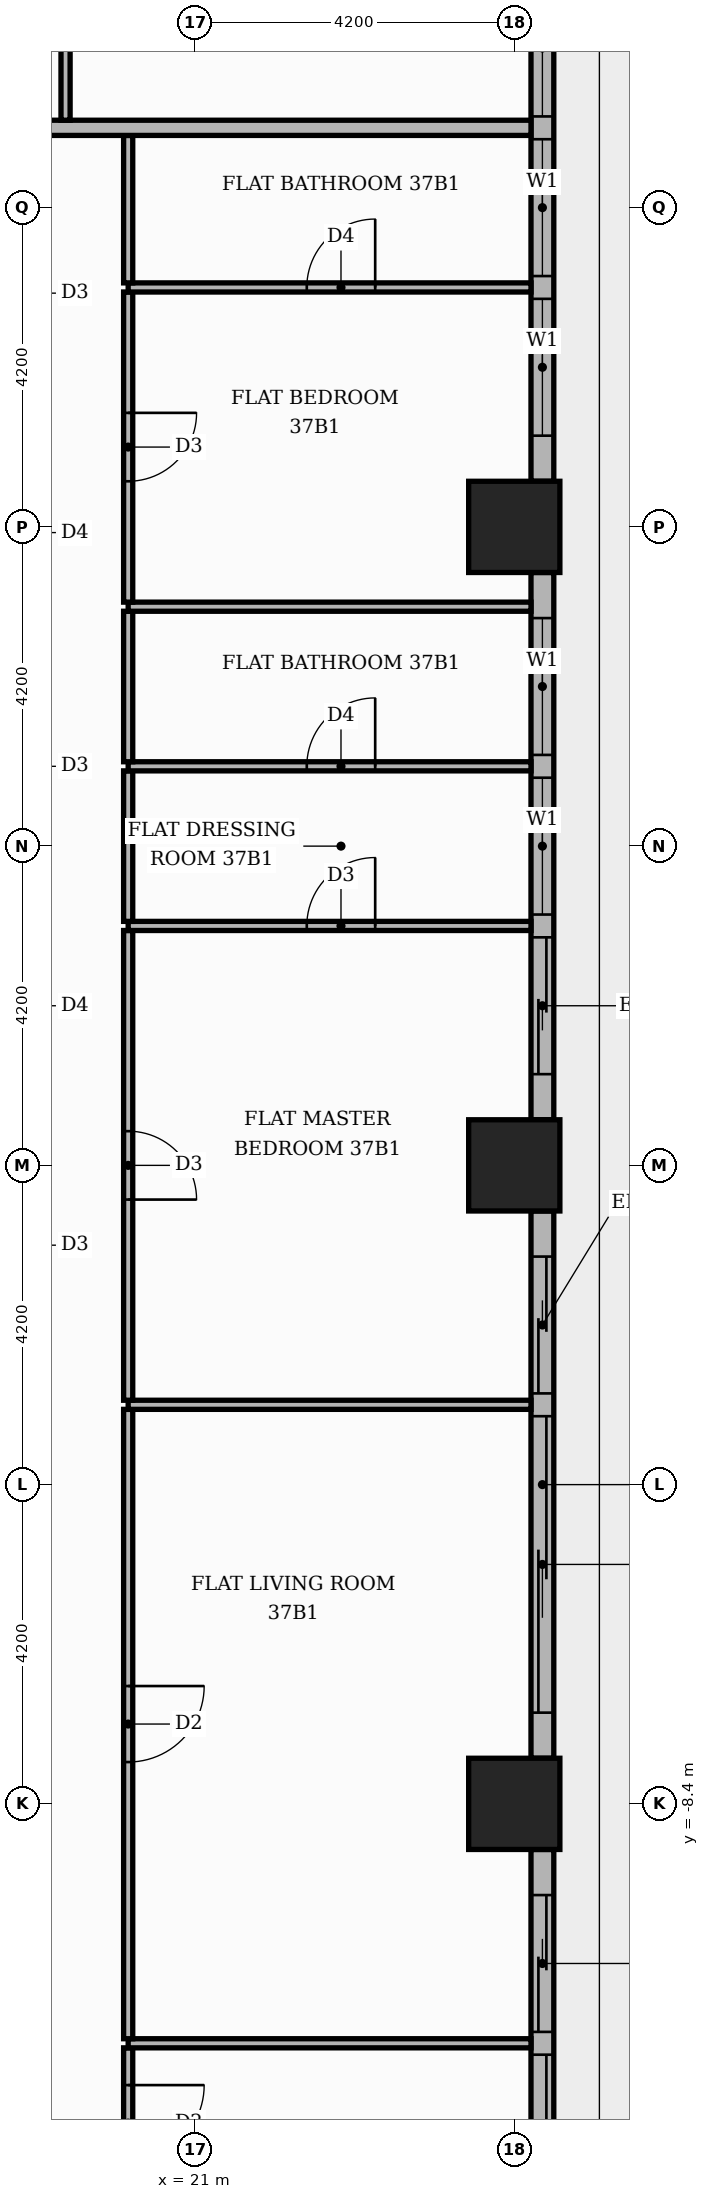
"""IFC4 building model, lengths in metres.
Left out: names, types, materials, properties, quantities, classifications, styles, units other than length and angle.
Written with IfcOpenShell. Run it as: python <this file> out.ifc"""

import sys

from ifc_helpers import new_model, si_unit, direction, frame, frame_2d, origin, origin_2d, place, context, subcontext, project, spatial, rectangle, extrude, element, fill, save


model = new_model("IFC4")
c1 = context("Model", 3, precision=1e-05, world=origin(), true_north=direction((0.0, 1.0)))
c2 = subcontext(c1, "Body", "Model", "MODEL_VIEW")
j1 = project(units=[si_unit("LENGTHUNIT", "METRE"), si_unit("PLANEANGLEUNIT", "RADIAN")], contexts=[c1])
p1 = place(None, origin())
s1 = spatial("IfcSite", under=j1, at=p1, CompositionType="ELEMENT")
p2 = place(p1, origin())
s2 = spatial("IfcBuilding", under=s1, at=p2, CompositionType="ELEMENT")
p3 = place(p2, frame((0.0, 0.0, 157.2)))
s3 = spatial("IfcBuildingStorey", under=s2, at=p3, CompositionType="ELEMENT", Elevation=157.2)
for number, where, z_axis, x_axis in (
    (1, (25.2, 0.0, 0.0), (0.0, 0.0, 1.0), (1.0, 0.0, 0.0)),
    (2, (25.2, 8.4, 0.0), (0.0, 0.0, 1.0), (1.0, 0.0, 0.0)),
    (3, (25.2, -8.4, 0.0), (0.0, 0.0, 1.0), (1.0, 0.0, 0.0)),
):
    element("IfcColumn", number, at=place(p3, frame(where, z_axis=z_axis, x_axis=x_axis)), inside=s3, PredefinedType="COLUMN", context=c2, shape_type="SweptSolid", body=[
        extrude(rectangle(XDim=1.2, YDim=1.2, at=origin_2d()), origin(), (0.0, 0.0, 1.0), 3.9),
    ])
p4 = place(p3, frame((25.57, -16.2, 0.0), z_axis=(0.0, 0.0, 1.0), x_axis=(0.0, 1.0, 0.0)))
e4 = element("IfcWall", 4, at=p4, inside=s3, PredefinedType="STANDARD", context=c2, shape_type="SweptSolid", body=[
    extrude(rectangle(XDim=7.2, YDim=0.3, at=frame_2d((3.6, 0.0))), origin(), (0.0, 0.0, 1.0), 3.48),
])
p5 = place(p4, frame((0.6, 0.0, 0.0)))
e5 = element("IfcOpeningElement", 5, at=p5, cuts=e4, PredefinedType="OPENING", context=c2, shape_type="SweptSolid", body=[
    extrude(rectangle(XDim=3.9, YDim=2.4, at=frame_2d((1.95, 1.2))), frame((0.0, 0.16, 0.0), z_axis=(0.0, -1.0, 0.0), x_axis=(1.0, 0.0, 0.0)), (0.0, 0.0, 1.0), 0.32),
])
p6 = place(p4, frame((4.8, 0.0, 0.0)))
e6 = element("IfcOpeningElement", 6, at=p6, cuts=e4, PredefinedType="OPENING", context=c2, shape_type="SweptSolid", body=[
    extrude(rectangle(XDim=1.8, YDim=2.4, at=frame_2d((0.9, 1.2))), frame((0.0, 0.16, 0.0), z_axis=(0.0, -1.0, 0.0), x_axis=(1.0, 0.0, 0.0)), (0.0, 0.0, 1.0), 0.32),
])
p7 = place(p3, frame((25.57, -7.8, 0.0), z_axis=(0.0, 0.0, 1.0), x_axis=(0.0, 1.0, 0.0)))
e7 = element("IfcWall", 7, at=p7, inside=s3, PredefinedType="STANDARD", context=c2, shape_type="SweptSolid", body=[
    extrude(rectangle(XDim=7.2, YDim=0.3, at=frame_2d((3.6, 0.0))), origin(), (0.0, 0.0, 1.0), 3.48),
])
p8 = place(p7, frame((0.6, 0.0, 0.0)))
e8 = element("IfcOpeningElement", 8, at=p8, cuts=e7, PredefinedType="OPENING", context=c2, shape_type="SweptSolid", body=[
    extrude(rectangle(XDim=3.9, YDim=2.4, at=frame_2d((1.95, 1.2))), frame((0.0, 0.16, 0.0), z_axis=(0.0, -1.0, 0.0), x_axis=(1.0, 0.0, 0.0)), (0.0, 0.0, 1.0), 0.32),
])
p9 = place(p7, frame((4.8, 0.0, 0.0)))
e9 = element("IfcOpeningElement", 9, at=p9, cuts=e7, PredefinedType="OPENING", context=c2, shape_type="SweptSolid", body=[
    extrude(rectangle(XDim=1.8, YDim=2.4, at=frame_2d((0.9, 1.2))), frame((0.0, 0.16, 0.0), z_axis=(0.0, -1.0, 0.0), x_axis=(1.0, 0.0, 0.0)), (0.0, 0.0, 1.0), 0.32),
])
p10 = place(p3, frame((25.57, 0.6, 0.0), z_axis=(0.0, 0.0, 1.0), x_axis=(0.0, 1.0, 0.0)))
e10 = element("IfcWall", 10, at=p10, inside=s3, PredefinedType="STANDARD", context=c2, shape_type="SweptSolid", body=[
    extrude(rectangle(XDim=7.2, YDim=0.3, at=frame_2d((3.6, 0.0))), origin(), (0.0, 0.0, 1.0), 3.48),
])
p11 = place(p10, frame((0.6, 0.0, 0.0)))
e11 = element("IfcOpeningElement", 11, at=p11, cuts=e10, PredefinedType="OPENING", context=c2, shape_type="SweptSolid", body=[
    extrude(rectangle(XDim=1.8, YDim=2.4, at=frame_2d((0.9, 1.2))), frame((0.0, 0.16, 0.0), z_axis=(0.0, -1.0, 0.0), x_axis=(1.0, 0.0, 0.0)), (0.0, 0.0, 1.0), 0.32),
])
p12 = place(p10, frame((2.7, 0.0, 0.9)))
e12 = element("IfcOpeningElement", 12, at=p12, cuts=e10, PredefinedType="OPENING", context=c2, shape_type="SweptSolid", body=[
    extrude(rectangle(XDim=1.8, YDim=2.1, at=frame_2d((0.9, 1.05))), frame((0.0, 0.16, 0.0), z_axis=(0.0, -1.0, 0.0), x_axis=(1.0, 0.0, 0.0)), (0.0, 0.0, 1.0), 0.32),
])
p13 = place(p10, frame((4.8, 0.0, 0.9)))
e13 = element("IfcOpeningElement", 13, at=p13, cuts=e10, PredefinedType="OPENING", context=c2, shape_type="SweptSolid", body=[
    extrude(rectangle(XDim=1.8, YDim=2.1, at=frame_2d((0.9, 1.05))), frame((0.0, 0.16, 0.0), z_axis=(0.0, -1.0, 0.0), x_axis=(1.0, 0.0, 0.0)), (0.0, 0.0, 1.0), 0.32),
])
p14 = place(p3, frame((25.57, 9.0, 0.0), z_axis=(0.0, 0.0, 1.0), x_axis=(0.0, 1.0, 0.0)))
e14 = element("IfcWall", 14, at=p14, inside=s3, PredefinedType="STANDARD", context=c2, shape_type="SweptSolid", body=[
    extrude(rectangle(XDim=7.2, YDim=0.3, at=frame_2d((3.6, 0.0))), origin(), (0.0, 0.0, 1.0), 3.48),
])
p15 = place(p14, frame((0.6, 0.0, 0.9)))
e15 = element("IfcOpeningElement", 15, at=p15, cuts=e14, PredefinedType="OPENING", context=c2, shape_type="SweptSolid", body=[
    extrude(rectangle(XDim=1.8, YDim=2.1, at=frame_2d((0.9, 1.05))), frame((0.0, 0.16, 0.0), z_axis=(0.0, -1.0, 0.0), x_axis=(1.0, 0.0, 0.0)), (0.0, 0.0, 1.0), 0.32),
])
p16 = place(p14, frame((2.7, 0.0, 0.9)))
e16 = element("IfcOpeningElement", 16, at=p16, cuts=e14, PredefinedType="OPENING", context=c2, shape_type="SweptSolid", body=[
    extrude(rectangle(XDim=1.8, YDim=2.1, at=frame_2d((0.9, 1.05))), frame((0.0, 0.16, 0.0), z_axis=(0.0, -1.0, 0.0), x_axis=(1.0, 0.0, 0.0)), (0.0, 0.0, 1.0), 0.32),
])
p17 = place(p14, frame((4.8, 0.0, 0.9)))
e17 = element("IfcOpeningElement", 17, at=p17, cuts=e14, PredefinedType="OPENING", context=c2, shape_type="SweptSolid", body=[
    extrude(rectangle(XDim=1.8, YDim=2.1, at=frame_2d((0.9, 1.05))), frame((0.0, 0.16, 0.0), z_axis=(0.0, -1.0, 0.0), x_axis=(1.0, 0.0, 0.0)), (0.0, 0.0, 1.0), 0.32),
])
p18 = place(p3, frame((20.12, -13.59, 0.0), z_axis=(0.0, 0.0, 1.0), x_axis=(0.0, 1.0, 0.0)))
e18 = element("IfcWall", 18, at=p18, inside=s3, PredefinedType="PARTITIONING", context=c2, shape_type="SweptSolid", body=[
    extrude(rectangle(XDim=1.98, YDim=0.12, at=frame_2d((0.99, 0.0))), origin(), (0.0, 0.0, 1.0), 3.48),
])
p19 = place(p18, frame((0.49, 0.0, 0.0)))
e19 = element("IfcOpeningElement", 19, at=p19, cuts=e18, PredefinedType="OPENING", context=c2, shape_type="SweptSolid", body=[
    extrude(rectangle(XDim=1.0, YDim=2.1, at=frame_2d((0.5, 1.05))), frame((0.0, 0.07, 0.0), z_axis=(0.0, -1.0, 0.0), x_axis=(1.0, 0.0, 0.0)), (0.0, 0.0, 1.0), 0.14),
])
p20 = place(p3, frame((20.12, -11.55, 0.0), z_axis=(0.0, 0.0, 1.0), x_axis=(1.0, 0.0, 0.0)))
e20 = element("IfcWall", 20, at=p20, inside=s3, PredefinedType="PARTITIONING", context=c2, shape_type="SweptSolid", body=[
    extrude(rectangle(XDim=5.3, YDim=0.12, at=frame_2d((2.65, 0.0))), origin(), (0.0, 0.0, 1.0), 3.48),
])
p21 = place(p3, frame((20.12, -11.49, 0.0), z_axis=(0.0, 0.0, 1.0), x_axis=(0.0, 1.0, 0.0)))
e21 = element("IfcWall", 21, at=p21, inside=s3, PredefinedType="PARTITIONING", context=c2, shape_type="SweptSolid", body=[
    extrude(rectangle(XDim=8.28, YDim=0.12, at=frame_2d((4.14, 0.0))), origin(), (0.0, 0.0, 1.0), 3.48),
])
p22 = place(p21, frame((3.64, 0.0, 0.0)))
e22 = element("IfcOpeningElement", 22, at=p22, cuts=e21, PredefinedType="OPENING", context=c2, shape_type="SweptSolid", body=[
    extrude(rectangle(XDim=1.0, YDim=2.1, at=frame_2d((0.5, 1.05))), frame((0.0, 0.07, 0.0), z_axis=(0.0, -1.0, 0.0), x_axis=(1.0, 0.0, 0.0)), (0.0, 0.0, 1.0), 0.14),
])
p23 = place(p3, frame((20.12, -3.15, 0.0), z_axis=(0.0, 0.0, 1.0), x_axis=(1.0, 0.0, 0.0)))
e23 = element("IfcWall", 23, at=p23, inside=s3, PredefinedType="PARTITIONING", context=c2, shape_type="SweptSolid", body=[
    extrude(rectangle(XDim=5.3, YDim=0.12, at=frame_2d((2.65, 0.0))), origin(), (0.0, 0.0, 1.0), 3.48),
])
p24 = place(p3, frame((20.12, -3.09, 0.0), z_axis=(0.0, 0.0, 1.0), x_axis=(0.0, 1.0, 0.0)))
e24 = element("IfcWall", 24, at=p24, inside=s3, PredefinedType="PARTITIONING", context=c2, shape_type="SweptSolid", body=[
    extrude(rectangle(XDim=6.18, YDim=0.12, at=frame_2d((3.09, 0.0))), origin(), (0.0, 0.0, 1.0), 3.48),
])
p25 = place(p24, frame((2.64, 0.0, 0.0)))
e25 = element("IfcOpeningElement", 25, at=p25, cuts=e24, PredefinedType="OPENING", context=c2, shape_type="SweptSolid", body=[
    extrude(rectangle(XDim=0.9, YDim=2.1, at=frame_2d((0.45, 1.05))), frame((0.0, 0.07, 0.0), z_axis=(0.0, -1.0, 0.0), x_axis=(1.0, 0.0, 0.0)), (0.0, 0.0, 1.0), 0.14),
])
p26 = place(p3, frame((20.12, 3.15, 0.0), z_axis=(0.0, 0.0, 1.0), x_axis=(1.0, 0.0, 0.0)))
e26 = element("IfcWall", 26, at=p26, inside=s3, PredefinedType="PARTITIONING", context=c2, shape_type="SweptSolid", body=[
    extrude(rectangle(XDim=5.3, YDim=0.12, at=frame_2d((2.65, 0.0))), origin(), (0.0, 0.0, 1.0), 3.48),
])
p27 = place(p26, frame((2.35, 0.0, 0.0)))
e27 = element("IfcOpeningElement", 27, at=p27, cuts=e26, PredefinedType="OPENING", context=c2, shape_type="SweptSolid", body=[
    extrude(rectangle(XDim=0.9, YDim=2.1, at=frame_2d((0.45, 1.05))), frame((0.0, 0.07, 0.0), z_axis=(0.0, -1.0, 0.0), x_axis=(1.0, 0.0, 0.0)), (0.0, 0.0, 1.0), 0.14),
])
p28 = place(p3, frame((20.12, 3.21, 0.0), z_axis=(0.0, 0.0, 1.0), x_axis=(0.0, 1.0, 0.0)))
e28 = element("IfcWall", 28, at=p28, inside=s3, PredefinedType="PARTITIONING", context=c2, shape_type="SweptSolid", body=[
    extrude(rectangle(XDim=1.98, YDim=0.12, at=frame_2d((0.99, 0.0))), origin(), (0.0, 0.0, 1.0), 3.48),
])
p29 = place(p3, frame((20.12, 5.25, 0.0), z_axis=(0.0, 0.0, 1.0), x_axis=(1.0, 0.0, 0.0)))
e29 = element("IfcWall", 29, at=p29, inside=s3, PredefinedType="PARTITIONING", context=c2, shape_type="SweptSolid", body=[
    extrude(rectangle(XDim=5.3, YDim=0.12, at=frame_2d((2.65, 0.0))), origin(), (0.0, 0.0, 1.0), 3.48),
])
p30 = place(p29, frame((2.35, 0.0, 0.0)))
e30 = element("IfcOpeningElement", 30, at=p30, cuts=e29, PredefinedType="OPENING", context=c2, shape_type="SweptSolid", body=[
    extrude(rectangle(XDim=0.9, YDim=2.1, at=frame_2d((0.45, 1.05))), frame((0.0, 0.07, 0.0), z_axis=(0.0, -1.0, 0.0), x_axis=(1.0, 0.0, 0.0)), (0.0, 0.0, 1.0), 0.14),
])
p31 = place(p3, frame((20.12, 5.31, 0.0), z_axis=(0.0, 0.0, 1.0), x_axis=(0.0, 1.0, 0.0)))
e31 = element("IfcWall", 31, at=p31, inside=s3, PredefinedType="PARTITIONING", context=c2, shape_type="SweptSolid", body=[
    extrude(rectangle(XDim=1.98, YDim=0.12, at=frame_2d((0.99, 0.0))), origin(), (0.0, 0.0, 1.0), 3.48),
])
p32 = place(p3, frame((20.12, 7.35, 0.0), z_axis=(0.0, 0.0, 1.0), x_axis=(1.0, 0.0, 0.0)))
e32 = element("IfcWall", 32, at=p32, inside=s3, PredefinedType="PARTITIONING", context=c2, shape_type="SweptSolid", body=[
    extrude(rectangle(XDim=5.3, YDim=0.12, at=frame_2d((2.65, 0.0))), origin(), (0.0, 0.0, 1.0), 3.48),
])
p33 = place(p3, frame((20.12, 7.41, 0.0), z_axis=(0.0, 0.0, 1.0), x_axis=(0.0, 1.0, 0.0)))
e33 = element("IfcWall", 33, at=p33, inside=s3, PredefinedType="PARTITIONING", context=c2, shape_type="SweptSolid", body=[
    extrude(rectangle(XDim=4.08, YDim=0.12, at=frame_2d((2.04, 0.0))), origin(), (0.0, 0.0, 1.0), 3.48),
])
p34 = place(p33, frame((1.59, 0.0, 0.0)))
e34 = element("IfcOpeningElement", 34, at=p34, cuts=e33, PredefinedType="OPENING", context=c2, shape_type="SweptSolid", body=[
    extrude(rectangle(XDim=0.9, YDim=2.1, at=frame_2d((0.45, 1.05))), frame((0.0, 0.07, 0.0), z_axis=(0.0, -1.0, 0.0), x_axis=(1.0, 0.0, 0.0)), (0.0, 0.0, 1.0), 0.14),
])
p35 = place(p3, frame((20.12, 11.55, 0.0), z_axis=(0.0, 0.0, 1.0), x_axis=(1.0, 0.0, 0.0)))
e35 = element("IfcWall", 35, at=p35, inside=s3, PredefinedType="PARTITIONING", context=c2, shape_type="SweptSolid", body=[
    extrude(rectangle(XDim=5.3, YDim=0.12, at=frame_2d((2.65, 0.0))), origin(), (0.0, 0.0, 1.0), 3.48),
])
p36 = place(p35, frame((2.35, 0.0, 0.0)))
e36 = element("IfcOpeningElement", 36, at=p36, cuts=e35, PredefinedType="OPENING", context=c2, shape_type="SweptSolid", body=[
    extrude(rectangle(XDim=0.9, YDim=2.1, at=frame_2d((0.45, 1.05))), frame((0.0, 0.07, 0.0), z_axis=(0.0, -1.0, 0.0), x_axis=(1.0, 0.0, 0.0)), (0.0, 0.0, 1.0), 0.14),
])
p37 = place(p3, frame((20.12, 11.61, 0.0), z_axis=(0.0, 0.0, 1.0), x_axis=(0.0, 1.0, 0.0)))
e37 = element("IfcWall", 37, at=p37, inside=s3, PredefinedType="PARTITIONING", context=c2, shape_type="SweptSolid", body=[
    extrude(rectangle(XDim=1.94, YDim=0.12, at=frame_2d((0.97, 0.0))), origin(), (0.0, 0.0, 1.0), 3.48),
])
p38 = place(p3, frame((-13.65, 13.65, 0.0), z_axis=(0.0, 0.0, 1.0), x_axis=(1.0, 0.0, 0.0)))
e38 = element("IfcWall", 38, at=p38, inside=s3, PredefinedType="PARTITIONING", context=c2, shape_type="SweptSolid", body=[
    extrude(rectangle(XDim=39.07, YDim=0.2, at=frame_2d((19.535, 0.0))), origin(), (0.0, 0.0, 1.0), 3.48),
])
p39 = place(p38, frame((24.65, 0.0, 0.0)))
e39 = element("IfcOpeningElement", 39, at=p39, cuts=e38, PredefinedType="OPENING", context=c2, shape_type="SweptSolid", body=[
    extrude(rectangle(XDim=1.1, YDim=2.4, at=frame_2d((0.55, 1.2))), frame((0.0, 0.11, 0.0), z_axis=(0.0, -1.0, 0.0), x_axis=(1.0, 0.0, 0.0)), (0.0, 0.0, 1.0), 0.22),
])
p40 = place(p38, frame((12.05, 0.0, 0.0)))
e40 = element("IfcOpeningElement", 40, at=p40, cuts=e38, PredefinedType="OPENING", context=c2, shape_type="SweptSolid", body=[
    extrude(rectangle(XDim=1.1, YDim=2.4, at=frame_2d((0.55, 1.2))), frame((0.0, 0.11, 0.0), z_axis=(0.0, -1.0, 0.0), x_axis=(1.0, 0.0, 0.0)), (0.0, 0.0, 1.0), 0.22),
])
p41 = place(p3, frame((19.296, 13.75, 0.0), z_axis=(0.0, 0.0, 1.0), x_axis=(0.0, 1.0, 0.0)))
e41 = element("IfcWall", 41, at=p41, inside=s3, PredefinedType="PARTITIONING", context=c2, shape_type="SweptSolid", body=[
    extrude(rectangle(XDim=3.75, YDim=0.12, at=frame_2d((1.875, 0.0))), origin(), (0.0, 0.0, 1.0), 3.48),
])
p42 = place(p5, origin())
e42 = element("IfcDoor", 42, at=p42, inside=s3, OperationType="SLIDING_TO_LEFT", PredefinedType="DOOR", context=c2, shape_type="SweptSolid", body=[
    extrude(rectangle(XDim=3.9, YDim=2.4, at=frame_2d((1.95, 1.2))), frame((0.0, 0.025, 0.0), z_axis=(0.0, -1.0, 0.0), x_axis=(1.0, 0.0, 0.0)), (0.0, 0.0, 1.0), 0.05),
])
fill(e5, e42)
p43 = place(p6, origin())
e43 = element("IfcDoor", 43, at=p43, inside=s3, OperationType="SLIDING_TO_RIGHT", PredefinedType="DOOR", context=c2, shape_type="SweptSolid", body=[
    extrude(rectangle(XDim=1.8, YDim=2.4, at=frame_2d((0.9, 1.2))), frame((0.0, 0.025, 0.0), z_axis=(0.0, -1.0, 0.0), x_axis=(1.0, 0.0, 0.0)), (0.0, 0.0, 1.0), 0.05),
])
fill(e6, e43)
p44 = place(p8, origin())
e44 = element("IfcDoor", 44, at=p44, inside=s3, OperationType="SLIDING_TO_LEFT", PredefinedType="DOOR", context=c2, shape_type="SweptSolid", body=[
    extrude(rectangle(XDim=3.9, YDim=2.4, at=frame_2d((1.95, 1.2))), frame((0.0, 0.025, 0.0), z_axis=(0.0, -1.0, 0.0), x_axis=(1.0, 0.0, 0.0)), (0.0, 0.0, 1.0), 0.05),
])
fill(e8, e44)
p45 = place(p9, origin())
e45 = element("IfcDoor", 45, at=p45, inside=s3, OperationType="SLIDING_TO_RIGHT", PredefinedType="DOOR", context=c2, shape_type="SweptSolid", body=[
    extrude(rectangle(XDim=1.8, YDim=2.4, at=frame_2d((0.9, 1.2))), frame((0.0, 0.025, 0.0), z_axis=(0.0, -1.0, 0.0), x_axis=(1.0, 0.0, 0.0)), (0.0, 0.0, 1.0), 0.05),
])
fill(e9, e45)
p46 = place(p11, origin())
e46 = element("IfcDoor", 46, at=p46, inside=s3, OperationType="SLIDING_TO_LEFT", PredefinedType="DOOR", context=c2, shape_type="SweptSolid", body=[
    extrude(rectangle(XDim=1.8, YDim=2.4, at=frame_2d((0.9, 1.2))), frame((0.0, 0.025, 0.0), z_axis=(0.0, -1.0, 0.0), x_axis=(1.0, 0.0, 0.0)), (0.0, 0.0, 1.0), 0.05),
])
fill(e11, e46)
p47 = place(p12, origin())
e47 = element("IfcWindow", 47, at=p47, inside=s3, PartitioningType="SINGLE_PANEL", PredefinedType="WINDOW", context=c2, shape_type="SweptSolid", body=[
    extrude(rectangle(XDim=1.8, YDim=2.1, at=frame_2d((0.9, 1.05))), frame((0.0, 0.03, 0.0), z_axis=(0.0, -1.0, 0.0), x_axis=(1.0, 0.0, 0.0)), (0.0, 0.0, 1.0), 0.06),
])
fill(e12, e47)
p48 = place(p13, origin())
e48 = element("IfcWindow", 48, at=p48, inside=s3, PartitioningType="SINGLE_PANEL", PredefinedType="WINDOW", context=c2, shape_type="SweptSolid", body=[
    extrude(rectangle(XDim=1.8, YDim=2.1, at=frame_2d((0.9, 1.05))), frame((0.0, 0.03, 0.0), z_axis=(0.0, -1.0, 0.0), x_axis=(1.0, 0.0, 0.0)), (0.0, 0.0, 1.0), 0.06),
])
fill(e13, e48)
p49 = place(p15, origin())
e49 = element("IfcWindow", 49, at=p49, inside=s3, PartitioningType="SINGLE_PANEL", PredefinedType="WINDOW", context=c2, shape_type="SweptSolid", body=[
    extrude(rectangle(XDim=1.8, YDim=2.1, at=frame_2d((0.9, 1.05))), frame((0.0, 0.03, 0.0), z_axis=(0.0, -1.0, 0.0), x_axis=(1.0, 0.0, 0.0)), (0.0, 0.0, 1.0), 0.06),
])
fill(e15, e49)
p50 = place(p16, origin())
e50 = element("IfcWindow", 50, at=p50, inside=s3, PartitioningType="SINGLE_PANEL", PredefinedType="WINDOW", context=c2, shape_type="SweptSolid", body=[
    extrude(rectangle(XDim=1.8, YDim=2.1, at=frame_2d((0.9, 1.05))), frame((0.0, 0.03, 0.0), z_axis=(0.0, -1.0, 0.0), x_axis=(1.0, 0.0, 0.0)), (0.0, 0.0, 1.0), 0.06),
])
fill(e16, e50)
p51 = place(p17, origin())
e51 = element("IfcWindow", 51, at=p51, inside=s3, PartitioningType="SINGLE_PANEL", PredefinedType="WINDOW", context=c2, shape_type="SweptSolid", body=[
    extrude(rectangle(XDim=1.8, YDim=2.1, at=frame_2d((0.9, 1.05))), frame((0.0, 0.03, 0.0), z_axis=(0.0, -1.0, 0.0), x_axis=(1.0, 0.0, 0.0)), (0.0, 0.0, 1.0), 0.06),
])
fill(e17, e51)
p52 = place(p19, frame((1.0, 0.0, 0.0), z_axis=(0.0, 0.0, 1.0), x_axis=(-1.0, 0.0, 0.0)))
e52 = element("IfcDoor", 52, at=p52, inside=s3, OperationType="SINGLE_SWING_RIGHT", PredefinedType="DOOR", context=c2, shape_type="SweptSolid", body=[
    extrude(rectangle(XDim=1.0, YDim=2.1, at=frame_2d((0.5, 1.05))), frame((0.0, 0.025, 0.0), z_axis=(0.0, -1.0, 0.0), x_axis=(1.0, 0.0, 0.0)), (0.0, 0.0, 1.0), 0.05),
])
fill(e19, e52)
p53 = place(p22, frame((1.0, 0.0, 0.0), z_axis=(0.0, 0.0, 1.0), x_axis=(-1.0, 0.0, 0.0)))
e53 = element("IfcDoor", 53, at=p53, inside=s3, OperationType="SINGLE_SWING_RIGHT", PredefinedType="DOOR", context=c2, shape_type="SweptSolid", body=[
    extrude(rectangle(XDim=1.0, YDim=2.1, at=frame_2d((0.5, 1.05))), frame((0.0, 0.025, 0.0), z_axis=(0.0, -1.0, 0.0), x_axis=(1.0, 0.0, 0.0)), (0.0, 0.0, 1.0), 0.05),
])
fill(e22, e53)
p54 = place(p25, frame((0.9, 0.0, 0.0), z_axis=(0.0, 0.0, 1.0), x_axis=(-1.0, 0.0, 0.0)))
e54 = element("IfcDoor", 54, at=p54, inside=s3, OperationType="SINGLE_SWING_LEFT", PredefinedType="DOOR", context=c2, shape_type="SweptSolid", body=[
    extrude(rectangle(XDim=0.9, YDim=2.1, at=frame_2d((0.45, 1.05))), frame((0.0, 0.025, 0.0), z_axis=(0.0, -1.0, 0.0), x_axis=(1.0, 0.0, 0.0)), (0.0, 0.0, 1.0), 0.05),
])
fill(e25, e54)
p55 = place(p27, origin())
e55 = element("IfcDoor", 55, at=p55, inside=s3, OperationType="SINGLE_SWING_RIGHT", PredefinedType="DOOR", context=c2, shape_type="SweptSolid", body=[
    extrude(rectangle(XDim=0.9, YDim=2.1, at=frame_2d((0.45, 1.05))), frame((0.0, 0.025, 0.0), z_axis=(0.0, -1.0, 0.0), x_axis=(1.0, 0.0, 0.0)), (0.0, 0.0, 1.0), 0.05),
])
fill(e27, e55)
p56 = place(p30, origin())
e56 = element("IfcDoor", 56, at=p56, inside=s3, OperationType="SINGLE_SWING_RIGHT", PredefinedType="DOOR", context=c2, shape_type="SweptSolid", body=[
    extrude(rectangle(XDim=0.9, YDim=2.1, at=frame_2d((0.45, 1.05))), frame((0.0, 0.025, 0.0), z_axis=(0.0, -1.0, 0.0), x_axis=(1.0, 0.0, 0.0)), (0.0, 0.0, 1.0), 0.05),
])
fill(e30, e56)
p57 = place(p34, frame((0.9, 0.0, 0.0), z_axis=(0.0, 0.0, 1.0), x_axis=(-1.0, 0.0, 0.0)))
e57 = element("IfcDoor", 57, at=p57, inside=s3, OperationType="SINGLE_SWING_RIGHT", PredefinedType="DOOR", context=c2, shape_type="SweptSolid", body=[
    extrude(rectangle(XDim=0.9, YDim=2.1, at=frame_2d((0.45, 1.05))), frame((0.0, 0.025, 0.0), z_axis=(0.0, -1.0, 0.0), x_axis=(1.0, 0.0, 0.0)), (0.0, 0.0, 1.0), 0.05),
])
fill(e34, e57)
p58 = place(p36, origin())
e58 = element("IfcDoor", 58, at=p58, inside=s3, OperationType="SINGLE_SWING_RIGHT", PredefinedType="DOOR", context=c2, shape_type="SweptSolid", body=[
    extrude(rectangle(XDim=0.9, YDim=2.1, at=frame_2d((0.45, 1.05))), frame((0.0, 0.025, 0.0), z_axis=(0.0, -1.0, 0.0), x_axis=(1.0, 0.0, 0.0)), (0.0, 0.0, 1.0), 0.05),
])
fill(e36, e58)
save(model, sys.argv[1])
